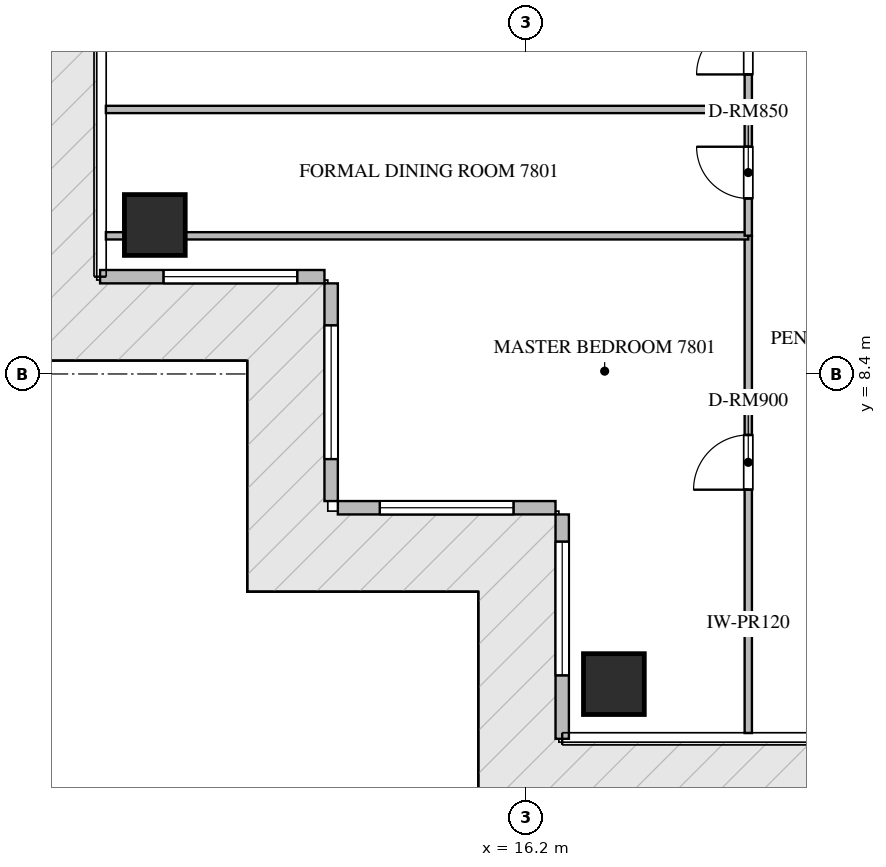
"""IFC4 building model, lengths in metres.
Left out: names, types, materials, properties, quantities, classifications, styles, units other than length and angle.
Written with IfcOpenShell. Run it as: python <this file> out.ifc"""

import sys

from ifc_helpers import new_model, si_unit, direction, frame, frame_2d, origin, origin_2d, place, context, subcontext, project, spatial, rectangle, extrude, source, transform, mapped, element, fill, save


model = new_model("IFC4")
c1 = context("Model", 3, precision=1e-05, world=origin(), true_north=direction((0.0, 1.0)))
c2 = subcontext(c1, "Body", "Model", "MODEL_VIEW")
j1 = project(units=[si_unit("LENGTHUNIT", "METRE"), si_unit("PLANEANGLEUNIT", "RADIAN")], contexts=[c1])
p1 = place(None, origin())
s1 = spatial("IfcSite", under=j1, at=p1, CompositionType="ELEMENT")
p2 = place(p1, origin())
s2 = spatial("IfcBuilding", under=s1, at=p2, CompositionType="ELEMENT")
p3 = place(p2, frame((0.0, 0.0, 313.7)))
s3 = spatial("IfcBuildingStorey", under=s2, at=p3, CompositionType="ELEMENT", Elevation=313.7)
m1 = source(origin(), c2, "Body", "SweptSolid", [
    extrude(rectangle(XDim=1.0, YDim=1.0, at=origin_2d()), origin(), (0.0, 0.0, 1.0), 4.05),
])
for number, where, z_axis, x_axis in (
    (1, (17.65, 3.3, -0.26), (0.0, 0.0, 1.0), (1.0, 0.0, 0.0)),
    (2, (10.1, 10.85, -0.26), (0.0, 0.0, 1.0), (1.0, 0.0, 0.0)),
):
    element("IfcColumn", number, at=place(p3, frame(where, z_axis=z_axis, x_axis=x_axis)), inside=s3, PredefinedType="COLUMN", context=c2, shape_type="MappedRepresentation", body=[
        mapped(m1, transform((0.0, 0.0, 0.0), scale=1.0)),
    ])
p4 = place(p3, frame((9.2, 10.0, 0.0), z_axis=(0.0, 0.0, 1.0), x_axis=(1.0, 0.0, 0.0)))
e3 = element("IfcWall", 3, at=p4, inside=s3, PredefinedType="ELEMENTEDWALL", context=c2, shape_type="SweptSolid", body=[
    extrude(rectangle(XDim=3.69, YDim=0.22, at=frame_2d((1.845, 0.0))), origin(), (0.0, 0.0, 1.0), 3.775),
])
p5 = place(p4, frame((1.043, 0.0, 0.65)))
e4 = element("IfcOpeningElement", 4, at=p5, cuts=e3, PredefinedType="OPENING", context=c2, shape_type="SweptSolid", body=[
    extrude(rectangle(XDim=2.2, YDim=2.4, at=frame_2d((1.1, 1.2))), frame((0.0, 0.12, 0.0), z_axis=(0.0, -1.0, 0.0), x_axis=(1.0, 0.0, 0.0)), (0.0, 0.0, 1.0), 0.24),
])
p6 = place(p3, frame((13.0, 9.89, 0.0), z_axis=(0.0, 0.0, 1.0), x_axis=(0.0, -1.0, 0.0)))
e5 = element("IfcWall", 5, at=p6, inside=s3, PredefinedType="ELEMENTEDWALL", context=c2, shape_type="SweptSolid", body=[
    extrude(rectangle(XDim=3.58, YDim=0.22, at=frame_2d((1.79, 0.0))), origin(), (0.0, 0.0, 1.0), 3.775),
])
p7 = place(p6, frame((0.69, 0.0, 0.65)))
e6 = element("IfcOpeningElement", 6, at=p7, cuts=e5, PredefinedType="OPENING", context=c2, shape_type="SweptSolid", body=[
    extrude(rectangle(XDim=2.2, YDim=2.4, at=frame_2d((1.1, 1.2))), frame((0.0, 0.12, 0.0), z_axis=(0.0, -1.0, 0.0), x_axis=(1.0, 0.0, 0.0)), (0.0, 0.0, 1.0), 0.24),
])
p8 = place(p3, frame((13.11, 6.2, 0.0), z_axis=(0.0, 0.0, 1.0), x_axis=(1.0, 0.0, 0.0)))
e7 = element("IfcWall", 7, at=p8, inside=s3, PredefinedType="ELEMENTEDWALL", context=c2, shape_type="SweptSolid", body=[
    extrude(rectangle(XDim=3.58, YDim=0.22, at=frame_2d((1.79, 0.0))), origin(), (0.0, 0.0, 1.0), 3.775),
])
p9 = place(p8, frame((0.69, 0.0, 0.65)))
e8 = element("IfcOpeningElement", 8, at=p9, cuts=e7, PredefinedType="OPENING", context=c2, shape_type="SweptSolid", body=[
    extrude(rectangle(XDim=2.2, YDim=2.4, at=frame_2d((1.1, 1.2))), frame((0.0, 0.12, 0.0), z_axis=(0.0, -1.0, 0.0), x_axis=(1.0, 0.0, 0.0)), (0.0, 0.0, 1.0), 0.24),
])
p10 = place(p3, frame((16.8, 6.09, 0.0), z_axis=(0.0, 0.0, 1.0), x_axis=(0.0, -1.0, 0.0)))
e9 = element("IfcWall", 9, at=p10, inside=s3, PredefinedType="ELEMENTEDWALL", context=c2, shape_type="SweptSolid", body=[
    extrude(rectangle(XDim=3.69, YDim=0.22, at=frame_2d((1.845, 0.0))), origin(), (0.0, 0.0, 1.0), 3.775),
])
p11 = place(p10, frame((0.447, 0.0, 0.65)))
e10 = element("IfcOpeningElement", 10, at=p11, cuts=e9, PredefinedType="OPENING", context=c2, shape_type="SweptSolid", body=[
    extrude(rectangle(XDim=2.2, YDim=2.4, at=frame_2d((1.1, 1.2))), frame((0.0, 0.12, 0.0), z_axis=(0.0, -1.0, 0.0), x_axis=(1.0, 0.0, 0.0)), (0.0, 0.0, 1.0), 0.24),
])
p12 = place(p3, frame((19.86, 2.495, 0.0), z_axis=(0.0, 0.0, 1.0), x_axis=(0.0, 1.0, 0.0)))
e11 = element("IfcWall", 11, at=p12, inside=s3, PredefinedType="PARTITIONING", context=c2, shape_type="SweptSolid", body=[
    extrude(rectangle(XDim=8.177, YDim=0.12, at=frame_2d((4.088, 0.0))), origin(), (0.0, 0.0, 1.0), 3.79),
])
p13 = place(p12, frame((4.002, 0.0, 0.0)))
e12 = element("IfcOpeningElement", 12, at=p13, cuts=e11, PredefinedType="OPENING", context=c2, shape_type="SweptSolid", body=[
    extrude(rectangle(XDim=0.9, YDim=2.1, at=frame_2d((0.45, 1.05))), frame((0.0, 0.07, 0.0), z_axis=(0.0, -1.0, 0.0), x_axis=(1.0, 0.0, 0.0)), (0.0, 0.0, 1.0), 0.14),
])
p14 = place(p3, frame((9.295, 10.672, 0.0), z_axis=(0.0, 0.0, 1.0), x_axis=(1.0, 0.0, 0.0)))
e13 = element("IfcWall", 13, at=p14, inside=s3, PredefinedType="PARTITIONING", context=c2, shape_type="SweptSolid", body=[
    extrude(rectangle(XDim=10.565, YDim=0.12, at=frame_2d((5.283, 0.0))), origin(), (0.0, 0.0, 1.0), 3.292),
])
p15 = place(p3, frame((9.295, 12.75, 0.0), z_axis=(0.0, 0.0, 1.0), x_axis=(1.0, 0.0, 0.0)))
e14 = element("IfcWall", 14, at=p15, inside=s3, PredefinedType="PARTITIONING", context=c2, shape_type="SweptSolid", body=[
    extrude(rectangle(XDim=10.565, YDim=0.12, at=frame_2d((5.283, 0.0))), origin(), (0.0, 0.0, 1.0), 3.79),
])
p16 = place(p3, frame((19.86, 10.674, 0.0), z_axis=(0.0, 0.0, 1.0), x_axis=(0.0, 1.0, 0.0)))
e15 = element("IfcWall", 15, at=p16, inside=s3, PredefinedType="PARTITIONING", context=c2, shape_type="SweptSolid", body=[
    extrude(rectangle(XDim=2.076, YDim=0.12, at=frame_2d((1.038, 0.0))), origin(), (0.0, 0.0, 1.0), 3.79),
])
p17 = place(p16, frame((0.613, 0.0, 0.0)))
e16 = element("IfcOpeningElement", 16, at=p17, cuts=e15, PredefinedType="OPENING", context=c2, shape_type="SweptSolid", body=[
    extrude(rectangle(XDim=0.85, YDim=2.1, at=frame_2d((0.425, 1.05))), frame((0.0, 0.07, 0.0), z_axis=(0.0, -1.0, 0.0), x_axis=(1.0, 0.0, 0.0)), (0.0, 0.0, 1.0), 0.14),
])
p18 = place(p3, frame((19.86, 12.752, 0.0), z_axis=(0.0, 0.0, 1.0), x_axis=(0.0, 1.0, 0.0)))
e17 = element("IfcWall", 17, at=p18, inside=s3, PredefinedType="PARTITIONING", context=c2, shape_type="SweptSolid", body=[
    extrude(rectangle(XDim=1.998, YDim=0.12, at=frame_2d((0.999, 0.0))), origin(), (0.0, 0.0, 1.0), 3.79),
])
p19 = place(p18, frame((0.574, 0.0, 0.0)))
e18 = element("IfcOpeningElement", 18, at=p19, cuts=e17, PredefinedType="OPENING", context=c2, shape_type="SweptSolid", body=[
    extrude(rectangle(XDim=0.85, YDim=2.1, at=frame_2d((0.425, 1.05))), frame((0.0, 0.07, 0.0), z_axis=(0.0, -1.0, 0.0), x_axis=(1.0, 0.0, 0.0)), (0.0, 0.0, 1.0), 0.14),
])
m2 = source(origin(), c2, "Body", "SweptSolid", [
    extrude(rectangle(XDim=2.2, YDim=2.4, at=frame_2d((1.1, 1.2))), frame((0.0, 0.03, 0.0), z_axis=(0.0, -1.0, 0.0), x_axis=(1.0, 0.0, 0.0)), (0.0, 0.0, 1.0), 0.06),
])
p20 = place(p5, origin())
e19 = element("IfcWindow", 19, at=p20, inside=s3, PartitioningType="SINGLE_PANEL", PredefinedType="WINDOW", context=c2, shape_type="MappedRepresentation", body=[
    mapped(m2, transform((0.0, 0.0, 0.0), scale=1.0)),
])
fill(e4, e19)
p21 = place(p7, origin())
e20 = element("IfcWindow", 20, at=p21, inside=s3, PartitioningType="SINGLE_PANEL", PredefinedType="WINDOW", context=c2, shape_type="MappedRepresentation", body=[
    mapped(m2, transform((0.0, 0.0, 0.0), scale=1.0)),
])
fill(e6, e20)
p22 = place(p9, origin())
e21 = element("IfcWindow", 21, at=p22, inside=s3, PartitioningType="SINGLE_PANEL", PredefinedType="WINDOW", context=c2, shape_type="MappedRepresentation", body=[
    mapped(m2, transform((0.0, 0.0, 0.0), scale=1.0)),
])
fill(e8, e21)
p23 = place(p11, origin())
e22 = element("IfcWindow", 22, at=p23, inside=s3, PartitioningType="SINGLE_PANEL", PredefinedType="WINDOW", context=c2, shape_type="MappedRepresentation", body=[
    mapped(m2, transform((0.0, 0.0, 0.0), scale=1.0)),
])
fill(e10, e22)
m3 = source(origin(), c2, "Body", "SweptSolid", [
    extrude(rectangle(XDim=0.9, YDim=2.1, at=frame_2d((0.45, 1.05))), frame((0.0, 0.025, 0.0), z_axis=(0.0, -1.0, 0.0), x_axis=(1.0, 0.0, 0.0)), (0.0, 0.0, 1.0), 0.05),
])
p24 = place(p13, origin())
e23 = element("IfcDoor", 23, at=p24, inside=s3, OperationType="SINGLE_SWING_LEFT", PredefinedType="DOOR", context=c2, shape_type="MappedRepresentation", body=[
    mapped(m3, transform((0.0, 0.0, 0.0), scale=1.0)),
])
fill(e12, e23)
m4 = source(origin(), c2, "Body", "SweptSolid", [
    extrude(rectangle(XDim=0.85, YDim=2.1, at=frame_2d((0.425, 1.05))), frame((0.0, 0.025, 0.0), z_axis=(0.0, -1.0, 0.0), x_axis=(1.0, 0.0, 0.0)), (0.0, 0.0, 1.0), 0.05),
])
p25 = place(p17, origin())
e24 = element("IfcDoor", 24, at=p25, inside=s3, OperationType="SINGLE_SWING_RIGHT", PredefinedType="DOOR", context=c2, shape_type="MappedRepresentation", body=[
    mapped(m4, transform((0.0, 0.0, 0.0), scale=1.0)),
])
fill(e16, e24)
p26 = place(p19, origin())
e25 = element("IfcDoor", 25, at=p26, inside=s3, OperationType="SINGLE_SWING_LEFT", PredefinedType="DOOR", context=c2, shape_type="MappedRepresentation", body=[
    mapped(m4, transform((0.0, 0.0, 0.0), scale=1.0)),
])
fill(e18, e25)
save(model, sys.argv[1])
